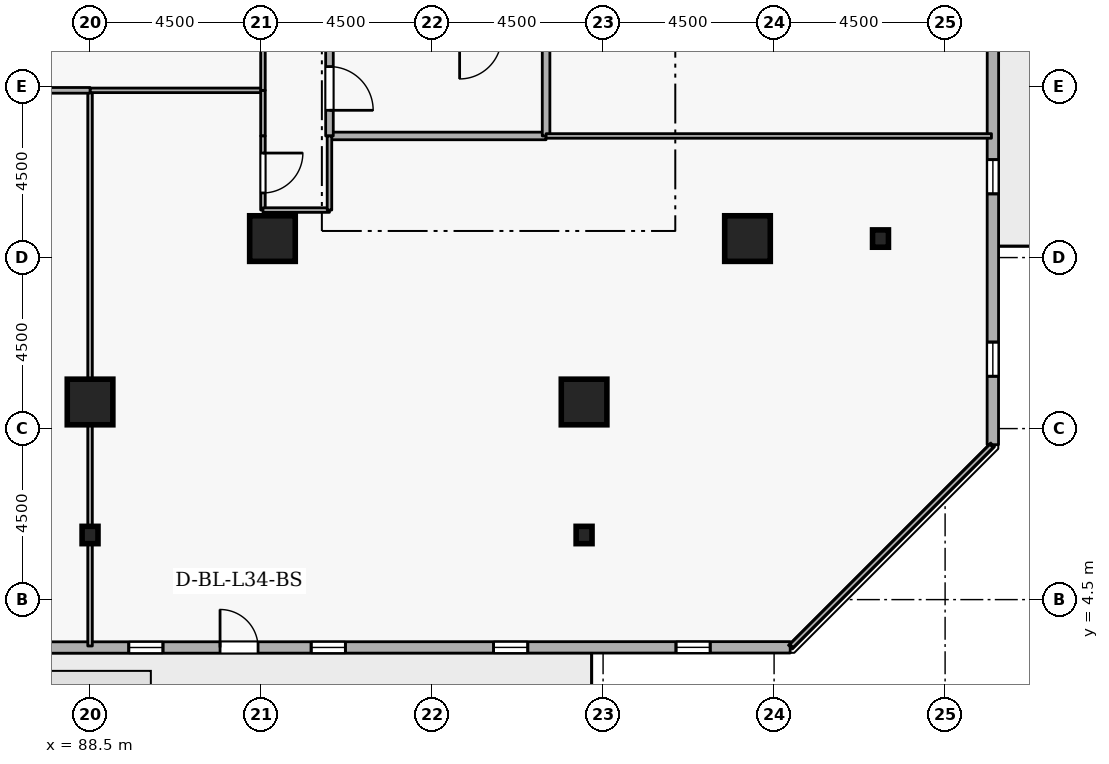
"""IFC4 building model, lengths in metres.
Left out: names, types, materials, properties, quantities, classifications, styles, units other than length and angle.
Written with IfcOpenShell. Run it as: python <this file> out.ifc"""

import sys

from ifc_helpers import new_model, si_unit, direction, frame, frame_2d, origin, origin_2d, place, context, subcontext, project, spatial, rectangle, i_section, extrude, element, fill, save


model = new_model("IFC4")
c1 = context("Model", 3, precision=1e-05, world=origin(), true_north=direction((0.0, 1.0)))
c2 = subcontext(c1, "Body", "Model", "MODEL_VIEW")
j1 = project(units=[si_unit("LENGTHUNIT", "METRE"), si_unit("PLANEANGLEUNIT", "RADIAN")], contexts=[c1])
p1 = place(None, origin())
s1 = spatial("IfcSite", under=j1, at=p1, CompositionType="ELEMENT")
p2 = place(p1, origin())
s2 = spatial("IfcBuilding", under=s1, at=p2, CompositionType="ELEMENT")
p3 = place(p2, frame((0.0, 0.0, 130.5)))
s3 = spatial("IfcBuildingStorey", under=s2, at=p3, CompositionType="ELEMENT", Elevation=130.5)
for number, where, z_axis, x_axis in (
    (1, (105.8, 14.0, 0.0), (0.0, 0.0, 1.0), (1.0, 0.0, 0.0)),
    (2, (101.5, 9.7, 0.0), (0.0, 0.0, 1.0), (1.0, 0.0, 0.0)),
    (3, (88.5, 9.7, 0.0), (0.0, 0.0, 1.0), (1.0, 0.0, 0.0)),
    (4, (93.3, 14.0, 0.0), (0.0, 0.0, 1.0), (1.0, 0.0, 0.0)),
):
    element("IfcColumn", number, at=place(p3, frame(where, z_axis=z_axis, x_axis=x_axis)), inside=s3, PredefinedType="COLUMN", context=c2, shape_type="SweptSolid", body=[
        extrude(rectangle(XDim=1.2, YDim=1.2, at=origin_2d()), origin(), (0.0, 0.0, 1.0), 3.6),
    ])
for number, where, z_axis, x_axis in (
    (5, (109.3, 14.0, 0.0), (0.0, 0.0, 1.0), (1.0, 0.0, 0.0)),
    (6, (101.5, 6.2, 0.0), (0.0, 0.0, 1.0), (1.0, 0.0, 0.0)),
    (7, (88.5, 6.2, 0.0), (0.0, 0.0, 1.0), (1.0, 0.0, 0.0)),
):
    element("IfcColumn", number, at=place(p3, frame(where, z_axis=z_axis, x_axis=x_axis)), inside=s3, PredefinedType="COLUMN", context=c2, shape_type="SweptSolid", body=[
        extrude(i_section(OverallWidth=0.418, OverallDepth=0.456, WebThickness=0.042, FlangeThickness=0.067, FilletRadius=0.015, at=origin_2d()), origin(), (0.0, 0.0, 1.0), 3.6),
    ])
p4 = place(p3, frame((73.319, 3.235, 0.0), z_axis=(0.0, 0.0, 1.0), x_axis=(0.999999963872, 0.000268805477, 0.0)))
e8 = element("IfcWall", 8, at=p4, inside=s3, PredefinedType="STANDARD", context=c2, shape_type="SweptSolid", body=[
    extrude(rectangle(XDim=33.605, YDim=0.3, at=frame_2d((16.802, 0.0))), origin(), (0.0, 0.0, 1.0), 2.7),
])
p5 = place(p4, frame((18.603, 0.0, 0.0)))
e9 = element("IfcOpeningElement", 9, at=p5, cuts=e8, PredefinedType="OPENING", context=c2, shape_type="SweptSolid", body=[
    extrude(rectangle(XDim=1.0, YDim=2.08, at=frame_2d((0.5, 1.04))), frame((0.0, 0.16, 0.0), z_axis=(0.0, -1.0, 0.0), x_axis=(1.0, 0.0, 0.0)), (0.0, 0.0, 1.0), 0.32),
])
p6 = place(p4, frame((1.8, 0.0, 0.72)))
e10 = element("IfcOpeningElement", 10, at=p6, cuts=e8, PredefinedType="OPENING", context=c2, shape_type="SweptSolid", body=[
    extrude(rectangle(XDim=0.9, YDim=1.75, at=frame_2d((0.45, 0.875))), frame((0.0, 0.16, 0.0), z_axis=(0.0, -1.0, 0.0), x_axis=(1.0, 0.0, 0.0)), (0.0, 0.0, 1.0), 0.32),
])
p7 = place(p4, frame((6.6, 0.0, 0.72)))
e11 = element("IfcOpeningElement", 11, at=p7, cuts=e8, PredefinedType="OPENING", context=c2, shape_type="SweptSolid", body=[
    extrude(rectangle(XDim=0.9, YDim=1.75, at=frame_2d((0.45, 0.875))), frame((0.0, 0.16, 0.0), z_axis=(0.0, -1.0, 0.0), x_axis=(1.0, 0.0, 0.0)), (0.0, 0.0, 1.0), 0.32),
])
p8 = place(p4, frame((11.4, 0.0, 0.72)))
e12 = element("IfcOpeningElement", 12, at=p8, cuts=e8, PredefinedType="OPENING", context=c2, shape_type="SweptSolid", body=[
    extrude(rectangle(XDim=0.9, YDim=1.75, at=frame_2d((0.45, 0.875))), frame((0.0, 0.16, 0.0), z_axis=(0.0, -1.0, 0.0), x_axis=(1.0, 0.0, 0.0)), (0.0, 0.0, 1.0), 0.32),
])
p9 = place(p4, frame((16.2, 0.0, 0.72)))
e13 = element("IfcOpeningElement", 13, at=p9, cuts=e8, PredefinedType="OPENING", context=c2, shape_type="SweptSolid", body=[
    extrude(rectangle(XDim=0.9, YDim=1.75, at=frame_2d((0.45, 0.875))), frame((0.0, 0.16, 0.0), z_axis=(0.0, -1.0, 0.0), x_axis=(1.0, 0.0, 0.0)), (0.0, 0.0, 1.0), 0.32),
])
p10 = place(p4, frame((21.0, 0.0, 0.72)))
e14 = element("IfcOpeningElement", 14, at=p10, cuts=e8, PredefinedType="OPENING", context=c2, shape_type="SweptSolid", body=[
    extrude(rectangle(XDim=0.9, YDim=1.75, at=frame_2d((0.45, 0.875))), frame((0.0, 0.16, 0.0), z_axis=(0.0, -1.0, 0.0), x_axis=(1.0, 0.0, 0.0)), (0.0, 0.0, 1.0), 0.32),
])
p11 = place(p4, frame((25.8, 0.0, 0.72)))
e15 = element("IfcOpeningElement", 15, at=p11, cuts=e8, PredefinedType="OPENING", context=c2, shape_type="SweptSolid", body=[
    extrude(rectangle(XDim=0.9, YDim=1.75, at=frame_2d((0.45, 0.875))), frame((0.0, 0.16, 0.0), z_axis=(0.0, -1.0, 0.0), x_axis=(1.0, 0.0, 0.0)), (0.0, 0.0, 1.0), 0.32),
])
p12 = place(p4, frame((30.6, 0.0, 0.72)))
e16 = element("IfcOpeningElement", 16, at=p12, cuts=e8, PredefinedType="OPENING", context=c2, shape_type="SweptSolid", body=[
    extrude(rectangle(XDim=0.9, YDim=1.75, at=frame_2d((0.45, 0.875))), frame((0.0, 0.16, 0.0), z_axis=(0.0, -1.0, 0.0), x_axis=(1.0, 0.0, 0.0)), (0.0, 0.0, 1.0), 0.32),
])
p13 = place(p3, frame((112.256, 8.576, 0.0), z_axis=(0.0, 0.0, 1.0), x_axis=(0.000268805477, 0.999999963872, 0.0)))
e17 = element("IfcWall", 17, at=p13, inside=s3, PredefinedType="STANDARD", context=c2, shape_type="SweptSolid", body=[
    extrude(rectangle(XDim=33.605, YDim=0.3, at=frame_2d((16.802, 0.0))), origin(), (0.0, 0.0, 1.0), 2.7),
])
p14 = place(p13, frame((26.702, 0.0, 0.0)))
e18 = element("IfcOpeningElement", 18, at=p14, cuts=e17, PredefinedType="OPENING", context=c2, shape_type="SweptSolid", body=[
    extrude(rectangle(XDim=1.0, YDim=2.08, at=frame_2d((0.5, 1.04))), frame((0.0, 0.16, 0.0), z_axis=(0.0, -1.0, 0.0), x_axis=(1.0, 0.0, 0.0)), (0.0, 0.0, 1.0), 0.32),
])
p15 = place(p13, frame((1.8, 0.0, 0.72)))
e19 = element("IfcOpeningElement", 19, at=p15, cuts=e17, PredefinedType="OPENING", context=c2, shape_type="SweptSolid", body=[
    extrude(rectangle(XDim=0.9, YDim=1.75, at=frame_2d((0.45, 0.875))), frame((0.0, 0.16, 0.0), z_axis=(0.0, -1.0, 0.0), x_axis=(1.0, 0.0, 0.0)), (0.0, 0.0, 1.0), 0.32),
])
p16 = place(p13, frame((6.6, 0.0, 0.72)))
e20 = element("IfcOpeningElement", 20, at=p16, cuts=e17, PredefinedType="OPENING", context=c2, shape_type="SweptSolid", body=[
    extrude(rectangle(XDim=0.9, YDim=1.75, at=frame_2d((0.45, 0.875))), frame((0.0, 0.16, 0.0), z_axis=(0.0, -1.0, 0.0), x_axis=(1.0, 0.0, 0.0)), (0.0, 0.0, 1.0), 0.32),
])
p17 = place(p13, frame((11.4, 0.0, 0.72)))
e21 = element("IfcOpeningElement", 21, at=p17, cuts=e17, PredefinedType="OPENING", context=c2, shape_type="SweptSolid", body=[
    extrude(rectangle(XDim=0.9, YDim=1.75, at=frame_2d((0.45, 0.875))), frame((0.0, 0.16, 0.0), z_axis=(0.0, -1.0, 0.0), x_axis=(1.0, 0.0, 0.0)), (0.0, 0.0, 1.0), 0.32),
])
p18 = place(p13, frame((16.2, 0.0, 0.72)))
e22 = element("IfcOpeningElement", 22, at=p18, cuts=e17, PredefinedType="OPENING", context=c2, shape_type="SweptSolid", body=[
    extrude(rectangle(XDim=0.9, YDim=1.75, at=frame_2d((0.45, 0.875))), frame((0.0, 0.16, 0.0), z_axis=(0.0, -1.0, 0.0), x_axis=(1.0, 0.0, 0.0)), (0.0, 0.0, 1.0), 0.32),
])
p19 = place(p13, frame((21.0, 0.0, 0.72)))
e23 = element("IfcOpeningElement", 23, at=p19, cuts=e17, PredefinedType="OPENING", context=c2, shape_type="SweptSolid", body=[
    extrude(rectangle(XDim=0.9, YDim=1.75, at=frame_2d((0.45, 0.875))), frame((0.0, 0.16, 0.0), z_axis=(0.0, -1.0, 0.0), x_axis=(1.0, 0.0, 0.0)), (0.0, 0.0, 1.0), 0.32),
])
p20 = place(p13, frame((30.6, 0.0, 0.72)))
e24 = element("IfcOpeningElement", 24, at=p20, cuts=e17, PredefinedType="OPENING", context=c2, shape_type="SweptSolid", body=[
    extrude(rectangle(XDim=0.9, YDim=1.75, at=frame_2d((0.45, 0.875))), frame((0.0, 0.16, 0.0), z_axis=(0.0, -1.0, 0.0), x_axis=(1.0, 0.0, 0.0)), (0.0, 0.0, 1.0), 0.32),
])
p21 = place(p3, frame((94.8, 16.7, 0.0), z_axis=(0.0, 0.0, 1.0), x_axis=(1.0, 0.0, 0.0)))
e25 = element("IfcWall", 25, at=p21, inside=s3, PredefinedType="STANDARD", context=c2, shape_type="SweptSolid", body=[
    extrude(rectangle(XDim=5.7, YDim=0.2, at=frame_2d((2.85, 0.0))), origin(), (0.0, 0.0, 1.0), 3.34),
])
p22 = place(p3, frame((100.5, 16.7, 0.0), z_axis=(0.0, 0.0, 1.0), x_axis=(0.0, 1.0, 0.0)))
e26 = element("IfcWall", 26, at=p22, inside=s3, PredefinedType="STANDARD", context=c2, shape_type="SweptSolid", body=[
    extrude(rectangle(XDim=2.5, YDim=0.2, at=frame_2d((1.25, 0.0))), origin(), (0.0, 0.0, 1.0), 3.34),
])
p23 = place(p3, frame((94.8, 19.2, 0.0), z_axis=(0.0, 0.0, 1.0), x_axis=(0.0, -1.0, 0.0)))
e27 = element("IfcWall", 27, at=p23, inside=s3, PredefinedType="STANDARD", context=c2, shape_type="SweptSolid", body=[
    extrude(rectangle(XDim=2.5, YDim=0.2, at=frame_2d((1.25, 0.0))), origin(), (0.0, 0.0, 1.0), 3.34),
])
p24 = place(p23, frame((0.675, 0.0, 0.0)))
e28 = element("IfcOpeningElement", 28, at=p24, cuts=e27, PredefinedType="OPENING", context=c2, shape_type="SweptSolid", body=[
    extrude(rectangle(XDim=1.15, YDim=2.1, at=frame_2d((0.575, 1.05))), frame((0.0, 0.11, 0.0), z_axis=(0.0, -1.0, 0.0), x_axis=(1.0, 0.0, 0.0)), (0.0, 0.0, 1.0), 0.22),
])
p25 = place(p3, frame((88.5, 3.28, 0.0), z_axis=(0.0, 0.0, 1.0), x_axis=(0.0, 1.0, 0.0)))
e29 = element("IfcWall", 29, at=p25, inside=s3, PredefinedType="PARTITIONING", context=c2, shape_type="SweptSolid", body=[
    extrude(rectangle(XDim=14.62, YDim=0.12, at=frame_2d((7.31, 0.0))), origin(), (0.0, 0.0, 1.0), 2.878),
])
p26 = place(p3, frame((88.5, 17.9, 0.0), z_axis=(0.0, 0.0, 1.0), x_axis=(1.0, 0.0, 0.0)))
e30 = element("IfcWall", 30, at=p26, inside=s3, PredefinedType="PARTITIONING", context=c2, shape_type="SweptSolid", body=[
    extrude(rectangle(XDim=4.55, YDim=0.12, at=frame_2d((2.275, 0.0))), origin(), (0.0, 0.0, 1.0), 3.34),
])
p27 = place(p3, frame((93.05, 17.9, 0.0), z_axis=(0.0, 0.0, 1.0), x_axis=(0.0, -1.0, 0.0)))
e31 = element("IfcWall", 31, at=p27, inside=s3, PredefinedType="PARTITIONING", context=c2, shape_type="SweptSolid", body=[
    extrude(rectangle(XDim=1.2, YDim=0.12, at=frame_2d((0.6, 0.0))), origin(), (0.0, 0.0, 1.0), 3.34),
])
p28 = place(p3, frame((93.05, 16.7, 0.0), z_axis=(0.0, 0.0, 1.0), x_axis=(0.0, -1.0, 0.0)))
e32 = element("IfcWall", 32, at=p28, inside=s3, PredefinedType="PARTITIONING", context=c2, shape_type="SweptSolid", body=[
    extrude(rectangle(XDim=1.95, YDim=0.12, at=frame_2d((0.975, 0.0))), origin(), (0.0, 0.0, 1.0), 3.34),
])
p29 = place(p28, frame((0.45, 0.0, 0.0)))
e33 = element("IfcOpeningElement", 33, at=p29, cuts=e32, PredefinedType="OPENING", context=c2, shape_type="SweptSolid", body=[
    extrude(rectangle(XDim=1.05, YDim=2.1, at=frame_2d((0.525, 1.05))), frame((0.0, 0.07, 0.0), z_axis=(0.0, -1.0, 0.0), x_axis=(1.0, 0.0, 0.0)), (0.0, 0.0, 1.0), 0.14),
])
p30 = place(p3, frame((93.05, 14.75, 0.0), z_axis=(0.0, 0.0, 1.0), x_axis=(1.0, 0.0, 0.0)))
e34 = element("IfcWall", 34, at=p30, inside=s3, PredefinedType="PARTITIONING", context=c2, shape_type="SweptSolid", body=[
    extrude(rectangle(XDim=1.75, YDim=0.12, at=frame_2d((0.875, 0.0))), origin(), (0.0, 0.0, 1.0), 3.34),
])
p31 = place(p3, frame((94.8, 14.75, 0.0), z_axis=(0.0, 0.0, 1.0), x_axis=(0.0, 1.0, 0.0)))
e35 = element("IfcWall", 35, at=p31, inside=s3, PredefinedType="PARTITIONING", context=c2, shape_type="SweptSolid", body=[
    extrude(rectangle(XDim=1.95, YDim=0.12, at=frame_2d((0.975, 0.0))), origin(), (0.0, 0.0, 1.0), 3.34),
])
p32 = place(p3, frame((100.5, 16.7, 0.0), z_axis=(0.0, 0.0, 1.0), x_axis=(1.0, 0.0, 0.0)))
e36 = element("IfcWall", 36, at=p32, inside=s3, PredefinedType="PARTITIONING", context=c2, shape_type="SweptSolid", body=[
    extrude(rectangle(XDim=11.72, YDim=0.12, at=frame_2d((5.86, 0.0))), origin(), (0.0, 0.0, 1.0), 3.34),
])
p33 = place(p3, frame((112.22, 8.544, 0.0), z_axis=(0.0, 0.0, 1.0), x_axis=(-0.707106781187, -0.707106781187, 0.0)))
e37 = element("IfcWall", 37, at=p33, inside=s3, PredefinedType="PARTITIONING", context=c2, shape_type="SweptSolid", body=[
    extrude(rectangle(XDim=7.444, YDim=0.12, at=frame_2d((3.722, 0.0))), origin(), (0.0, 0.0, 1.0), 3.34),
])
p34 = place(p3, frame((83.95, 17.9, 0.0), z_axis=(0.0, 0.0, 1.0), x_axis=(1.0, 0.0, 0.0)))
e38 = element("IfcWall", 38, at=p34, inside=s3, PredefinedType="PARTITIONING", context=c2, shape_type="SweptSolid", body=[
    extrude(rectangle(XDim=4.55, YDim=0.15, at=frame_2d((2.275, 0.0))), origin(), (0.0, 0.0, 1.0), 3.34),
])
p35 = place(p3, frame((93.05, 22.4, 0.0), z_axis=(0.0, 0.0, 1.0), x_axis=(0.0, -1.0, 0.0)))
e39 = element("IfcWall", 39, at=p35, inside=s3, PredefinedType="PARTITIONING", context=c2, shape_type="SweptSolid", body=[
    extrude(rectangle(XDim=4.5, YDim=0.12, at=frame_2d((2.25, 0.0))), origin(), (0.0, 0.0, 1.0), 3.34),
])
p36 = place(p5, origin())
e40 = element("IfcDoor", 40, at=p36, inside=s3, OperationType="SINGLE_SWING_LEFT", PredefinedType="DOOR", context=c2, shape_type="SweptSolid", body=[
    extrude(rectangle(XDim=1.0, YDim=2.08, at=frame_2d((0.5, 1.04))), frame((0.0, 0.025, 0.0), z_axis=(0.0, -1.0, 0.0), x_axis=(1.0, 0.0, 0.0)), (0.0, 0.0, 1.0), 0.05),
])
fill(e9, e40)
p37 = place(p9, origin())
e41 = element("IfcWindow", 41, at=p37, inside=s3, PartitioningType="SINGLE_PANEL", PredefinedType="WINDOW", context=c2, shape_type="SweptSolid", body=[
    extrude(rectangle(XDim=0.9, YDim=1.75, at=frame_2d((0.45, 0.875))), frame((0.0, 0.03, 0.0), z_axis=(0.0, -1.0, 0.0), x_axis=(1.0, 0.0, 0.0)), (0.0, 0.0, 1.0), 0.06),
])
fill(e13, e41)
p38 = place(p10, origin())
e42 = element("IfcWindow", 42, at=p38, inside=s3, PartitioningType="SINGLE_PANEL", PredefinedType="WINDOW", context=c2, shape_type="SweptSolid", body=[
    extrude(rectangle(XDim=0.9, YDim=1.75, at=frame_2d((0.45, 0.875))), frame((0.0, 0.03, 0.0), z_axis=(0.0, -1.0, 0.0), x_axis=(1.0, 0.0, 0.0)), (0.0, 0.0, 1.0), 0.06),
])
fill(e14, e42)
p39 = place(p11, origin())
e43 = element("IfcWindow", 43, at=p39, inside=s3, PartitioningType="SINGLE_PANEL", PredefinedType="WINDOW", context=c2, shape_type="SweptSolid", body=[
    extrude(rectangle(XDim=0.9, YDim=1.75, at=frame_2d((0.45, 0.875))), frame((0.0, 0.03, 0.0), z_axis=(0.0, -1.0, 0.0), x_axis=(1.0, 0.0, 0.0)), (0.0, 0.0, 1.0), 0.06),
])
fill(e15, e43)
p40 = place(p12, origin())
e44 = element("IfcWindow", 44, at=p40, inside=s3, PartitioningType="SINGLE_PANEL", PredefinedType="WINDOW", context=c2, shape_type="SweptSolid", body=[
    extrude(rectangle(XDim=0.9, YDim=1.75, at=frame_2d((0.45, 0.875))), frame((0.0, 0.03, 0.0), z_axis=(0.0, -1.0, 0.0), x_axis=(1.0, 0.0, 0.0)), (0.0, 0.0, 1.0), 0.06),
])
fill(e16, e44)
p41 = place(p15, origin())
e45 = element("IfcWindow", 45, at=p41, inside=s3, PartitioningType="SINGLE_PANEL", PredefinedType="WINDOW", context=c2, shape_type="SweptSolid", body=[
    extrude(rectangle(XDim=0.9, YDim=1.75, at=frame_2d((0.45, 0.875))), frame((0.0, 0.03, 0.0), z_axis=(0.0, -1.0, 0.0), x_axis=(1.0, 0.0, 0.0)), (0.0, 0.0, 1.0), 0.06),
])
fill(e19, e45)
p42 = place(p16, origin())
e46 = element("IfcWindow", 46, at=p42, inside=s3, PartitioningType="SINGLE_PANEL", PredefinedType="WINDOW", context=c2, shape_type="SweptSolid", body=[
    extrude(rectangle(XDim=0.9, YDim=1.75, at=frame_2d((0.45, 0.875))), frame((0.0, 0.03, 0.0), z_axis=(0.0, -1.0, 0.0), x_axis=(1.0, 0.0, 0.0)), (0.0, 0.0, 1.0), 0.06),
])
fill(e20, e46)
p43 = place(p24, origin())
e47 = element("IfcDoor", 47, at=p43, inside=s3, OperationType="SINGLE_SWING_RIGHT", PredefinedType="DOOR", context=c2, shape_type="SweptSolid", body=[
    extrude(rectangle(XDim=1.15, YDim=2.1, at=frame_2d((0.575, 1.05))), frame((0.0, 0.025, 0.0), z_axis=(0.0, -1.0, 0.0), x_axis=(1.0, 0.0, 0.0)), (0.0, 0.0, 1.0), 0.05),
])
fill(e28, e47)
p44 = place(p29, origin())
e48 = element("IfcDoor", 48, at=p44, inside=s3, OperationType="SINGLE_SWING_LEFT", PredefinedType="DOOR", context=c2, shape_type="SweptSolid", body=[
    extrude(rectangle(XDim=1.05, YDim=2.1, at=frame_2d((0.525, 1.05))), frame((0.0, 0.025, 0.0), z_axis=(0.0, -1.0, 0.0), x_axis=(1.0, 0.0, 0.0)), (0.0, 0.0, 1.0), 0.05),
])
fill(e33, e48)
save(model, sys.argv[1])
